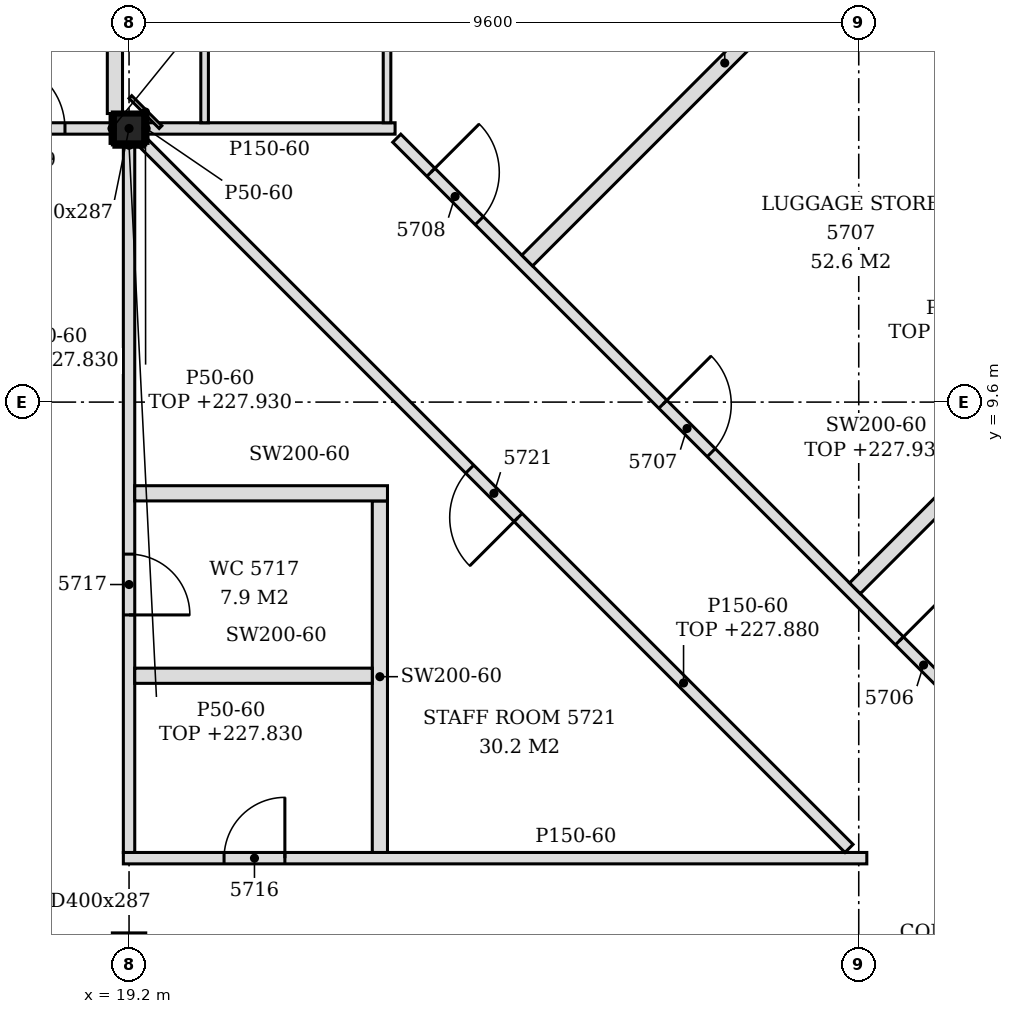
"""IFC4 building model, lengths in metres.
Left out: names, types, materials, properties, quantities, classifications, styles, units other than length and angle.
Written with IfcOpenShell. Run it as: python <this file> out.ifc"""

import sys

from ifc_helpers import new_model, si_unit, direction, frame, frame_2d, origin, origin_2d, place, context, subcontext, project, spatial, polyline, rectangle, i_section, outline, extrude, element, fill, save


model = new_model("IFC4")
c1 = context("Model", 3, precision=1e-05, world=origin(), true_north=direction((0.0, 1.0)))
c2 = subcontext(c1, "Body", "Model", "MODEL_VIEW")
j1 = project(units=[si_unit("LENGTHUNIT", "METRE"), si_unit("PLANEANGLEUNIT", "RADIAN")], contexts=[c1])
p1 = place(None, origin())
s1 = spatial("IfcSite", under=j1, at=p1, CompositionType="ELEMENT")
p2 = place(p1, origin())
s2 = spatial("IfcBuilding", under=s1, at=p2, CompositionType="ELEMENT")
p3 = place(p2, frame((0.0, 0.0, 225.0)))
s3 = spatial("IfcBuildingStorey", under=s2, at=p3, CompositionType="ELEMENT", Elevation=225.0)
p4 = place(p3, frame((19.2, 13.2, -0.15), z_axis=(0.0, 0.0, 1.0), x_axis=(1.0, 0.0, 0.0)))
e1 = element("IfcColumn", 1, at=p4, inside=s3, PredefinedType="COLUMN", context=c2, shape_type="SweptSolid", body=[
    extrude(i_section(OverallWidth=0.399, OverallDepth=0.393, WebThickness=0.023, FlangeThickness=0.037, FilletRadius=0.015, at=origin_2d()), origin(), (0.0, 0.0, 1.0), 3.6),
])
p5 = place(p3, frame((33.341, 2.453, 0.0), z_axis=(0.0, 0.0, 1.0), x_axis=(-0.707098652635, 0.707114909645, 0.0)))
e2 = element("IfcWall", 2, at=p5, inside=s3, PredefinedType="PARTITIONING", context=c2, shape_type="SweptSolid", body=[
    extrude(rectangle(XDim=15.018, YDim=0.15, at=frame_2d((7.509, 0.0))), origin(), (0.0, 0.0, 1.0), 2.88),
])
p6 = place(p5, frame((4.766, 0.0, 0.0)))
e3 = element("IfcOpeningElement", 3, at=p6, cuts=e2, PredefinedType="OPENING", context=c2, shape_type="SweptSolid", body=[
    extrude(rectangle(XDim=0.9, YDim=2.1, at=frame_2d((0.45, 1.05))), frame((0.0, 0.085, 0.0), z_axis=(0.0, -1.0, 0.0), x_axis=(1.0, 0.0, 0.0)), (0.0, 0.0, 1.0), 0.17),
])
p7 = place(p5, frame((9.167, 0.0, 0.0)))
e4 = element("IfcOpeningElement", 4, at=p7, cuts=e2, PredefinedType="OPENING", context=c2, shape_type="SweptSolid", body=[
    extrude(rectangle(XDim=0.9, YDim=2.1, at=frame_2d((0.45, 1.05))), frame((0.0, 0.085, 0.0), z_axis=(0.0, -1.0, 0.0), x_axis=(1.0, 0.0, 0.0)), (0.0, 0.0, 1.0), 0.17),
])
p8 = place(p5, frame((13.482, 0.0, 0.0)))
e5 = element("IfcOpeningElement", 5, at=p8, cuts=e2, PredefinedType="OPENING", context=c2, shape_type="SweptSolid", body=[
    extrude(rectangle(XDim=0.9, YDim=2.1, at=frame_2d((0.45, 1.05))), frame((0.0, 0.085, 0.0), z_axis=(0.0, -1.0, 0.0), x_axis=(1.0, 0.0, 0.0)), (0.0, 0.0, 1.0), 0.17),
])
p9 = place(p3, frame((19.125, 3.6, 0.0), z_axis=(0.0, 0.0, 1.0), x_axis=(1.0, 0.0, 0.0)))
e6 = element("IfcWall", 6, at=p9, inside=s3, PredefinedType="PARTITIONING", context=c2, shape_type="SweptSolid", body=[
    extrude(outline(polyline([(0.0, 0.0), (9.781, 0.0), (9.781, 3.45), (0.225, 3.45), (0.223, 2.83), (0.0, 2.83), (0.0, 0.0)])), frame((0.0, 0.075, 0.0), z_axis=(0.0, -1.0, 0.0), x_axis=(1.0, 0.0, 0.0)), (0.0, 0.0, 1.0), 0.15),
])
p10 = place(p9, frame((1.325, 0.0, 0.0)))
e7 = element("IfcOpeningElement", 7, at=p10, cuts=e6, PredefinedType="OPENING", context=c2, shape_type="SweptSolid", body=[
    extrude(rectangle(XDim=0.8, YDim=2.1, at=frame_2d((0.4, 1.05))), frame((0.0, 0.085, 0.0), z_axis=(0.0, -1.0, 0.0), x_axis=(1.0, 0.0, 0.0)), (0.0, 0.0, 1.0), 0.17),
])
p11 = place(p3, frame((19.2, 3.675, 0.0), z_axis=(0.0, 0.0, 1.0), x_axis=(0.0, 1.0, 0.0)))
e8 = element("IfcWall", 8, at=p11, inside=s3, PredefinedType="PARTITIONING", context=c2, shape_type="SweptSolid", body=[
    extrude(rectangle(XDim=9.328, YDim=0.15, at=frame_2d((4.664, 0.0))), origin(), (0.0, 0.0, 1.0), 2.83),
])
p12 = place(p11, frame((3.125, 0.0, 0.0)))
e9 = element("IfcOpeningElement", 9, at=p12, cuts=e8, PredefinedType="OPENING", context=c2, shape_type="SweptSolid", body=[
    extrude(rectangle(XDim=0.8, YDim=2.1, at=frame_2d((0.4, 1.05))), frame((0.0, 0.085, 0.0), z_axis=(0.0, -1.0, 0.0), x_axis=(1.0, 0.0, 0.0)), (0.0, 0.0, 1.0), 0.17),
])
p13 = place(p3, frame((22.5, 3.675, 0.0), z_axis=(0.0, 0.0, 1.0), x_axis=(0.0, 1.0, 0.0)))
e10 = element("IfcWall", 10, at=p13, inside=s3, PredefinedType="PARTITIONING", context=c2, shape_type="SweptSolid", body=[
    extrude(outline(polyline([(0.0, 0.0), (4.625, 0.0), (4.625, 3.45), (1.23, 3.45), (1.228, 2.88), (1.02, 2.88), (1.018, 3.45), (0.0, 3.45), (0.0, 0.0)])), frame((0.0, 0.1, 0.0), z_axis=(0.0, -1.0, 0.0), x_axis=(1.0, 0.0, 0.0)), (0.0, 0.0, 1.0), 0.2),
])
p14 = place(p3, frame((28.672, 3.728, 0.0), z_axis=(0.0, 0.0, 1.0), x_axis=(-0.707116088468, 0.707097473782, 0.0)))
e11 = element("IfcWall", 11, at=p14, inside=s3, PredefinedType="PARTITIONING", context=c2, shape_type="SweptSolid", body=[
    extrude(rectangle(XDim=13.115, YDim=0.15, at=frame_2d((6.558, 0.0))), origin(), (0.0, 0.0, 1.0), 2.88),
])
p15 = place(p14, frame((6.157, 0.0, 0.0)))
e12 = element("IfcOpeningElement", 12, at=p15, cuts=e11, PredefinedType="OPENING", context=c2, shape_type="SweptSolid", body=[
    extrude(rectangle(XDim=0.9, YDim=2.1, at=frame_2d((0.45, 1.05))), frame((0.0, 0.085, 0.0), z_axis=(0.0, -1.0, 0.0), x_axis=(1.0, 0.0, 0.0)), (0.0, 0.0, 1.0), 0.17),
])
p16 = place(p3, frame((19.275, 6.0, 0.0), z_axis=(0.0, 0.0, 1.0), x_axis=(1.0, 0.0, 0.0)))
e13 = element("IfcWall", 13, at=p16, inside=s3, PredefinedType="PARTITIONING", context=c2, shape_type="SweptSolid", body=[
    extrude(outline(polyline([(0.0, 0.0), (3.125, 0.0), (3.125, 3.45), (0.075, 3.45), (0.073, 2.83), (0.0, 2.83), (0.0, 0.0)])), frame((0.0, 0.1, 0.0), z_axis=(0.0, -1.0, 0.0), x_axis=(1.0, 0.0, 0.0)), (0.0, 0.0, 1.0), 0.2),
])
p17 = place(p3, frame((28.75, 7.15, 0.0), z_axis=(0.0, 0.0, 1.0), x_axis=(0.7070684525, 0.707145107796, 0.0)))
e14 = element("IfcWall", 14, at=p17, inside=s3, PredefinedType="PARTITIONING", context=c2, shape_type="SweptSolid", body=[
    extrude(rectangle(XDim=3.185, YDim=0.2, at=frame_2d((1.592, 0.0))), origin(), (0.0, 0.0, 1.0), 2.93),
])
p18 = place(p3, frame((19.275, 8.4, 0.0), z_axis=(0.0, 0.0, 1.0), x_axis=(1.0, 0.0, 0.0)))
e15 = element("IfcWall", 15, at=p18, inside=s3, PredefinedType="PARTITIONING", context=c2, shape_type="SweptSolid", body=[
    extrude(outline(polyline([(0.0, 0.0), (3.325, 0.0), (3.325, 3.45), (0.075, 3.45), (0.073, 2.83), (0.0, 2.83), (0.0, 0.0)])), frame((0.0, 0.1, 0.0), z_axis=(0.0, -1.0, 0.0), x_axis=(1.0, 0.0, 0.0)), (0.0, 0.0, 1.0), 0.2),
])
p19 = place(p3, frame((24.438, 11.462, 0.0), z_axis=(0.0, 0.0, 1.0), x_axis=(0.707090175614, 0.707123386369, 0.0)))
e16 = element("IfcWall", 16, at=p19, inside=s3, PredefinedType="PARTITIONING", context=c2, shape_type="SweptSolid", body=[
    extrude(rectangle(XDim=7.351, YDim=0.2, at=frame_2d((3.676, 0.0))), origin(), (0.0, 0.0, 1.0), 2.88),
])
p20 = place(p3, frame((7.399, 13.2, 0.0), z_axis=(0.0, 0.0, 1.0), x_axis=(1.0, 0.0, 0.0)))
e17 = element("IfcWall", 17, at=p20, inside=s3, PredefinedType="PARTITIONING", context=c2, shape_type="SweptSolid", body=[
    extrude(rectangle(XDim=11.601, YDim=0.15, at=frame_2d((5.801, 0.0))), origin(), (0.0, 0.0, 1.0), 2.83),
])
p21 = place(p20, frame((10.058, 0.0, 0.0)))
e18 = element("IfcOpeningElement", 18, at=p21, cuts=e17, PredefinedType="OPENING", context=c2, shape_type="SweptSolid", body=[
    extrude(rectangle(XDim=0.9, YDim=2.1, at=frame_2d((0.45, 1.05))), frame((0.0, 0.085, 0.0), z_axis=(0.0, -1.0, 0.0), x_axis=(1.0, 0.0, 0.0)), (0.0, 0.0, 1.0), 0.17),
])
p22 = place(p3, frame((19.399, 13.2, 0.0), z_axis=(0.0, 0.0, 1.0), x_axis=(1.0, 0.0, 0.0)))
e19 = element("IfcWall", 19, at=p22, inside=s3, PredefinedType="PARTITIONING", context=c2, shape_type="SweptSolid", body=[
    extrude(rectangle(XDim=3.301, YDim=0.15, at=frame_2d((1.65, 0.0))), origin(), (0.0, 0.0, 1.0), 3.45),
])
for number, where, z_axis, x_axis in (
    (20, (20.194, 13.275, 0.0), (0.0, 0.0, 1.0), (0.0, 1.0, 0.0)),
    (21, (22.594, 13.275, 0.0), (0.0, 0.0, 1.0), (0.0, 1.0, 0.0)),
):
    element("IfcWall", number, at=place(p3, frame(where, z_axis=z_axis, x_axis=x_axis)), inside=s3, PredefinedType="PARTITIONING", context=c2, shape_type="SweptSolid", body=[
        extrude(outline(polyline([(0.0, 0.0), (2.275, 0.0), (2.275, 3.45), (1.23, 3.45), (1.228, 2.88), (1.02, 2.88), (1.018, 3.45), (0.0, 3.45), (0.0, 0.0)])), frame((0.0, 0.05, 0.0), z_axis=(0.0, -1.0, 0.0), x_axis=(1.0, 0.0, 0.0)), (0.0, 0.0, 1.0), 0.1),
    ])
p23 = place(p3, frame((19.014, 13.396, 0.0), z_axis=(0.0, 0.0, 1.0), x_axis=(0.0, 1.0, 0.0)))
e22 = element("IfcWall", 22, at=p23, inside=s3, PredefinedType="PARTITIONING", context=c2, shape_type="SweptSolid", body=[
    extrude(outline(polyline([(0.0, 0.0), (10.224, 0.0), (10.223, 3.45), (9.854, 3.45), (9.852, 2.93), (5.908, 2.93), (5.906, 2.88), (5.698, 2.88), (5.697, 2.93), (0.003, 2.93), (0.001, 3.45), (0.0, 3.45), (0.0, 0.0)])), frame((0.0, 0.1, 0.0), z_axis=(0.0, -1.0, 0.0), x_axis=(1.0, 0.0, 0.0)), (0.0, 0.0, 1.0), 0.2),
])
p24 = place(p3, frame((18.976, 13.003, 0.0), z_axis=(0.0, 0.0, 1.0), x_axis=(0.0, 1.0, 0.0)))
e23 = element("IfcWall", 23, at=p24, inside=s3, PredefinedType="PARTITIONING", context=c2, shape_type="SweptSolid", body=[
    extrude(rectangle(XDim=0.393, YDim=0.05, at=frame_2d((0.197, 0.0))), origin(), (0.0, 0.0, 1.0), 2.83),
])
p25 = place(p3, frame((19.614, 13.218, 0.0), z_axis=(0.0, 0.0, 1.0), x_axis=(-0.707106781187, 0.707106781187, 0.0)))
e24 = element("IfcWall", 24, at=p25, inside=s3, PredefinedType="PARTITIONING", context=c2, shape_type="SweptSolid", body=[
    extrude(rectangle(XDim=0.56, YDim=0.05, at=frame_2d((0.28, 0.0))), origin(), (0.0, 0.0, 1.0), 2.93),
])
p26 = place(p3, frame((19.0, 12.979, 0.0), z_axis=(0.0, 0.0, 1.0), x_axis=(1.0, 0.0, 0.0)))
e25 = element("IfcWall", 25, at=p26, inside=s3, PredefinedType="PARTITIONING", context=c2, shape_type="SweptSolid", body=[
    extrude(rectangle(XDim=0.399, YDim=0.05, at=frame_2d((0.199, 0.0))), origin(), (0.0, 0.0, 1.0), 2.83),
])
p27 = place(p3, frame((19.425, 13.003, 0.0), z_axis=(0.0, 0.0, 1.0), x_axis=(0.0, 1.0, 0.0)))
e26 = element("IfcWall", 26, at=p27, inside=s3, PredefinedType="PARTITIONING", context=c2, shape_type="SweptSolid", body=[
    extrude(rectangle(XDim=0.393, YDim=0.05, at=frame_2d((0.197, 0.0))), origin(), (0.0, 0.0, 1.0), 3.45),
])
p28 = place(p6, frame((0.9, 0.0, 0.0), z_axis=(0.0, 0.0, 1.0), x_axis=(-1.0, 0.0, 0.0)))
e27 = element("IfcDoor", 27, at=p28, inside=s3, OperationType="SINGLE_SWING_LEFT", PredefinedType="DOOR", context=c2, shape_type="SweptSolid", body=[
    extrude(rectangle(XDim=0.9, YDim=2.1, at=frame_2d((0.45, 1.05))), frame((0.0, 0.025, 0.0), z_axis=(0.0, -1.0, 0.0), x_axis=(1.0, 0.0, 0.0)), (0.0, 0.0, 1.0), 0.05),
])
fill(e3, e27)
p29 = place(p7, frame((0.9, 0.0, 0.0), z_axis=(0.0, 0.0, 1.0), x_axis=(-1.0, 0.0, 0.0)))
e28 = element("IfcDoor", 28, at=p29, inside=s3, OperationType="SINGLE_SWING_LEFT", PredefinedType="DOOR", context=c2, shape_type="SweptSolid", body=[
    extrude(rectangle(XDim=0.9, YDim=2.1, at=frame_2d((0.45, 1.05))), frame((0.0, 0.025, 0.0), z_axis=(0.0, -1.0, 0.0), x_axis=(1.0, 0.0, 0.0)), (0.0, 0.0, 1.0), 0.05),
])
fill(e4, e28)
p30 = place(p8, frame((0.9, 0.0, 0.0), z_axis=(0.0, 0.0, 1.0), x_axis=(-1.0, 0.0, 0.0)))
e29 = element("IfcDoor", 29, at=p30, inside=s3, OperationType="SINGLE_SWING_LEFT", PredefinedType="DOOR", context=c2, shape_type="SweptSolid", body=[
    extrude(rectangle(XDim=0.9, YDim=2.1, at=frame_2d((0.45, 1.05))), frame((0.0, 0.025, 0.0), z_axis=(0.0, -1.0, 0.0), x_axis=(1.0, 0.0, 0.0)), (0.0, 0.0, 1.0), 0.05),
])
fill(e5, e29)
p31 = place(p21, origin())
e30 = element("IfcDoor", 30, at=p31, inside=s3, OperationType="SINGLE_SWING_LEFT", PredefinedType="DOOR", context=c2, shape_type="SweptSolid", body=[
    extrude(rectangle(XDim=0.9, YDim=2.1, at=frame_2d((0.45, 1.05))), frame((0.0, 0.025, 0.0), z_axis=(0.0, -1.0, 0.0), x_axis=(1.0, 0.0, 0.0)), (0.0, 0.0, 1.0), 0.05),
])
fill(e18, e30)
p32 = place(p10, origin())
e31 = element("IfcDoor", 31, at=p32, inside=s3, OperationType="SINGLE_SWING_RIGHT", PredefinedType="DOOR", context=c2, shape_type="SweptSolid", body=[
    extrude(rectangle(XDim=0.8, YDim=2.1, at=frame_2d((0.4, 1.05))), frame((0.0, 0.025, 0.0), z_axis=(0.0, -1.0, 0.0), x_axis=(1.0, 0.0, 0.0)), (0.0, 0.0, 1.0), 0.05),
])
fill(e7, e31)
p33 = place(p12, frame((0.8, 0.0, 0.0), z_axis=(0.0, 0.0, 1.0), x_axis=(-1.0, 0.0, 0.0)))
e32 = element("IfcDoor", 32, at=p33, inside=s3, OperationType="SINGLE_SWING_RIGHT", PredefinedType="DOOR", context=c2, shape_type="SweptSolid", body=[
    extrude(rectangle(XDim=0.8, YDim=2.1, at=frame_2d((0.4, 1.05))), frame((0.0, 0.025, 0.0), z_axis=(0.0, -1.0, 0.0), x_axis=(1.0, 0.0, 0.0)), (0.0, 0.0, 1.0), 0.05),
])
fill(e9, e32)
p34 = place(p15, origin())
e33 = element("IfcDoor", 33, at=p34, inside=s3, OperationType="SINGLE_SWING_LEFT", PredefinedType="DOOR", context=c2, shape_type="SweptSolid", body=[
    extrude(rectangle(XDim=0.9, YDim=2.1, at=frame_2d((0.45, 1.05))), frame((0.0, 0.025, 0.0), z_axis=(0.0, -1.0, 0.0), x_axis=(1.0, 0.0, 0.0)), (0.0, 0.0, 1.0), 0.05),
])
fill(e12, e33)
save(model, sys.argv[1])
